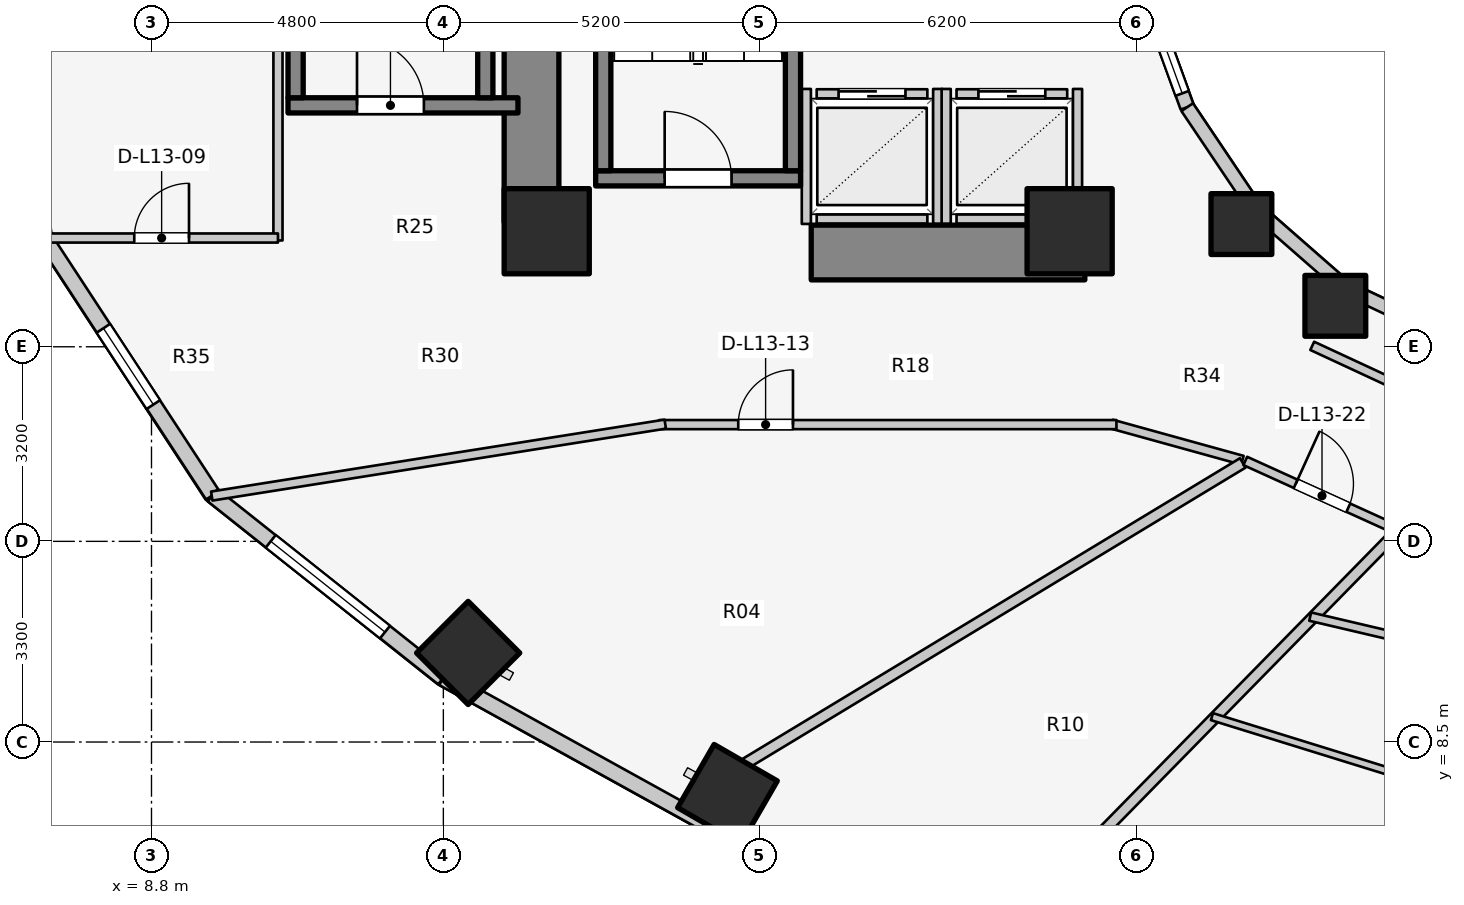
"""IFC4 building model, lengths in metres.
Left out: names, types, materials, properties, quantities, classifications, styles, units other than length and angle.
Written with IfcOpenShell. Run it as: python <this file> out.ifc"""

import sys

from ifc_helpers import new_model, si_unit, direction, frame, frame_2d, origin, origin_2d, place, context, subcontext, project, spatial, rectangle, extrude, element, fill, save


model = new_model("IFC4")
c1 = context("Model", 3, precision=1e-05, world=origin(), true_north=direction((0.0, 1.0)))
c2 = subcontext(c1, "Body", "Model", "MODEL_VIEW")
j1 = project(units=[si_unit("LENGTHUNIT", "METRE"), si_unit("PLANEANGLEUNIT", "RADIAN")], contexts=[c1])
p1 = place(None, origin())
s1 = spatial("IfcSite", under=j1, at=p1, CompositionType="ELEMENT")
p2 = place(p1, origin())
s2 = spatial("IfcBuilding", under=s1, at=p2, CompositionType="ELEMENT")
p3 = place(p2, frame((0.0, 0.0, 46.2)))
s3 = spatial("IfcBuildingStorey", under=s2, at=p3, CompositionType="ELEMENT", Elevation=46.2)
p4 = place(p3, frame((15.05, 17.05, 0.0), z_axis=(0.0, 0.0, 1.0), x_axis=(0.0, 1.0, 0.0)))
e1 = element("IfcWall", 1, at=p4, inside=s3, PredefinedType="SHEAR", context=c2, shape_type="SweptSolid", body=[
    extrude(rectangle(XDim=12.8, YDim=0.9, at=frame_2d((6.4, 0.0))), origin(), (0.0, 0.0, 1.0), 3.1),
])
p5 = place(p3, frame((19.65, 16.55, 0.0), z_axis=(0.0, 0.0, 1.0), x_axis=(1.0, 0.0, 0.0)))
e2 = element("IfcWall", 2, at=p5, inside=s3, PredefinedType="SHEAR", context=c2, shape_type="SweptSolid", body=[
    extrude(rectangle(XDim=4.5, YDim=0.9, at=frame_2d((2.25, 0.0))), origin(), (0.0, 0.0, 1.0), 3.1),
])
p6 = place(p3, frame((16.105, 17.77, 0.0), z_axis=(0.0, 0.0, 1.0), x_axis=(1.0, 0.0, 0.0)))
e3 = element("IfcWall", 3, at=p6, inside=s3, PredefinedType="SOLIDWALL", context=c2, shape_type="SweptSolid", body=[
    extrude(rectangle(XDim=3.37, YDim=0.25, at=frame_2d((1.685, 0.0))), origin(), (0.0, 0.0, 1.0), 3.1),
])
p7 = place(p6, frame((1.135, 0.0, 0.0)))
e4 = element("IfcOpeningElement", 4, at=p7, cuts=e3, PredefinedType="OPENING", context=c2, shape_type="SweptSolid", body=[
    extrude(rectangle(XDim=1.1, YDim=2.1, at=frame_2d((0.55, 1.05))), frame((0.0, 0.135, 0.0), z_axis=(0.0, -1.0, 0.0), x_axis=(1.0, 0.0, 0.0)), (0.0, 0.0, 1.0), 0.27),
])
for number, where, z_axis, x_axis in (
    (5, (16.23, 17.895, 0.0), (0.0, 0.0, 1.0), (0.0, 1.0, 0.0)),
    (6, (19.35, 17.895, 0.0), (0.0, 0.0, 1.0), (0.0, 1.0, 0.0)),
):
    element("IfcWall", number, at=place(p3, frame(where, z_axis=z_axis, x_axis=x_axis)), inside=s3, PredefinedType="SOLIDWALL", context=c2, shape_type="SweptSolid", body=[
        extrude(rectangle(XDim=7.81, YDim=0.25, at=frame_2d((3.905, 0.0))), origin(), (0.0, 0.0, 1.0), 3.1),
    ])
p8 = place(p3, frame((11.045, 18.97, 0.0), z_axis=(0.0, 0.0, 1.0), x_axis=(1.0, 0.0, 0.0)))
e7 = element("IfcWall", 7, at=p8, inside=s3, PredefinedType="SOLIDWALL", context=c2, shape_type="SweptSolid", body=[
    extrude(rectangle(XDim=3.782, YDim=0.25, at=frame_2d((1.891, 0.0))), origin(), (0.0, 0.0, 1.0), 3.1),
])
p9 = place(p8, frame((1.135, 0.0, 0.0)))
e8 = element("IfcOpeningElement", 8, at=p9, cuts=e7, PredefinedType="OPENING", context=c2, shape_type="SweptSolid", body=[
    extrude(rectangle(XDim=1.1, YDim=2.1, at=frame_2d((0.55, 1.05))), frame((0.0, 0.135, 0.0), z_axis=(0.0, -1.0, 0.0), x_axis=(1.0, 0.0, 0.0)), (0.0, 0.0, 1.0), 0.27),
])
for number, where, z_axis, x_axis in (
    (9, (11.17, 19.095, 0.0), (0.0, 0.0, 1.0), (0.0, 1.0, 0.0)),
    (10, (14.29, 19.095, 0.0), (0.0, 0.0, 1.0), (0.0, 1.0, 0.0)),
):
    element("IfcWall", number, at=place(p3, frame(where, z_axis=z_axis, x_axis=x_axis)), inside=s3, PredefinedType="SOLIDWALL", context=c2, shape_type="SweptSolid", body=[
        extrude(rectangle(XDim=7.81, YDim=0.25, at=frame_2d((3.905, 0.0))), origin(), (0.0, 0.0, 1.0), 3.1),
    ])
for number, where, z_axis, x_axis in (
    (11, (15.3, 16.9, 0.0), (0.0, 0.0, 1.0), (1.0, 0.0, 0.0)),
    (12, (23.9, 16.9, 0.0), (0.0, 0.0, 1.0), (1.0, 0.0, 0.0)),
):
    element("IfcColumn", number, at=place(p3, frame(where, z_axis=z_axis, x_axis=x_axis)), inside=s3, PredefinedType="COLUMN", context=c2, shape_type="SweptSolid", body=[
        extrude(rectangle(XDim=1.4, YDim=1.4, at=origin_2d()), origin(), (0.0, 0.0, 1.0), 3.1),
    ])
p10 = place(p3, frame((26.725, 17.018, 0.0), z_axis=(0.0, 0.0, 1.0), x_axis=(1.0, 0.0, 0.0)))
e13 = element("IfcColumn", 13, at=p10, inside=s3, PredefinedType="COLUMN", context=c2, shape_type="SweptSolid", body=[
    extrude(rectangle(XDim=1.0, YDim=1.0, at=origin_2d()), origin(), (0.0, 0.0, 1.0), 3.1),
])
p11 = place(p3, frame((14.008, 9.965, 0.0), z_axis=(0.0, 0.0, 1.0), x_axis=(-0.707106781187, -0.707106781187, 0.0)))
e14 = element("IfcColumn", 14, at=p11, inside=s3, PredefinedType="COLUMN", context=c2, shape_type="SweptSolid", body=[
    extrude(rectangle(XDim=1.2, YDim=1.2, at=origin_2d()), origin(), (0.0, 0.0, 1.0), 3.1),
])
p12 = place(p3, frame((28.27, 15.673, 0.0), z_axis=(0.0, 0.0, 1.0), x_axis=(1.0, 0.0, 0.0)))
e15 = element("IfcColumn", 15, at=p12, inside=s3, PredefinedType="COLUMN", context=c2, shape_type="SweptSolid", body=[
    extrude(rectangle(XDim=1.0, YDim=1.0, at=origin_2d()), origin(), (0.0, 0.0, 1.0), 3.1),
])
p13 = place(p3, frame((18.273, 7.641, 0.0), z_axis=(0.0, 0.0, 1.0), x_axis=(-0.5, -0.866025403784, 0.0)))
e16 = element("IfcColumn", 16, at=p13, inside=s3, PredefinedType="COLUMN", context=c2, shape_type="SweptSolid", body=[
    extrude(rectangle(XDim=1.2, YDim=1.2, at=origin_2d()), origin(), (0.0, 0.0, 1.0), 3.1),
])
p14 = place(p3, frame((25.123, 20.898, 0.0), z_axis=(0.0, 0.0, 1.0), x_axis=(0.341423187295, -0.93990968033, 0.0)))
e17 = element("IfcWall", 17, at=p14, inside=s3, PredefinedType="STANDARD", context=c2, shape_type="SweptSolid", body=[
    extrude(rectangle(XDim=2.084, YDim=0.23, at=frame_2d((1.042, 0.0))), origin(), (0.0, 0.0, 1.0), 2.84),
])
p15 = place(p14, frame((0.242, 0.0, 0.85)))
e18 = element("IfcOpeningElement", 18, at=p15, cuts=e17, PredefinedType="OPENING", context=c2, shape_type="SweptSolid", body=[
    extrude(rectangle(XDim=1.6, YDim=1.65, at=frame_2d((0.8, 0.825))), frame((0.0, 0.125, 0.0), z_axis=(0.0, -1.0, 0.0), x_axis=(1.0, 0.0, 0.0)), (0.0, 0.0, 1.0), 0.25),
])
p16 = place(p3, frame((25.834, 18.94, 0.0), z_axis=(0.0, 0.0, 1.0), x_axis=(0.558197800898, -0.829707909492, 0.0)))
e19 = element("IfcWall", 19, at=p16, inside=s3, PredefinedType="STANDARD", context=c2, shape_type="SweptSolid", body=[
    extrude(rectangle(XDim=2.027, YDim=0.23, at=frame_2d((1.013, 0.0))), origin(), (0.0, 0.0, 1.0), 2.16),
])
p17 = place(p3, frame((26.965, 17.258, 0.0), z_axis=(0.0, 0.0, 1.0), x_axis=(0.752576694707, -0.658504607869, 0.0)))
e20 = element("IfcWall", 20, at=p17, inside=s3, PredefinedType="STANDARD", context=c2, shape_type="SweptSolid", body=[
    extrude(rectangle(XDim=1.959, YDim=0.23, at=frame_2d((0.98, 0.0))), origin(), (0.0, 0.0, 1.0), 2.16),
])
p18 = place(p3, frame((28.44, 15.968, 0.0), z_axis=(0.0, 0.0, 1.0), x_axis=(0.904179699603, -0.427152280606, 0.0)))
e21 = element("IfcWall", 21, at=p18, inside=s3, PredefinedType="STANDARD", context=c2, shape_type="SweptSolid", body=[
    extrude(rectangle(XDim=1.899, YDim=0.23, at=frame_2d((0.95, 0.0))), origin(), (0.0, 0.0, 1.0), 2.16),
])
p19 = place(p3, frame((7.033, 16.795, 0.0), z_axis=(0.0, 0.0, 1.0), x_axis=(0.547702757047, -0.836672988642, 0.0)))
e22 = element("IfcWall", 22, at=p19, inside=s3, PredefinedType="STANDARD", context=c2, shape_type="SweptSolid", body=[
    extrude(rectangle(XDim=5.062, YDim=0.26, at=frame_2d((2.531, 0.0))), origin(), (0.0, 0.0, 1.0), 2.85),
])
p20 = place(p19, frame((1.781, 0.0, 0.75)))
e23 = element("IfcOpeningElement", 23, at=p20, cuts=e22, PredefinedType="OPENING", context=c2, shape_type="SweptSolid", body=[
    extrude(rectangle(XDim=1.5, YDim=1.6, at=frame_2d((0.75, 0.8))), frame((0.0, 0.14, 0.0), z_axis=(0.0, -1.0, 0.0), x_axis=(1.0, 0.0, 0.0)), (0.0, 0.0, 1.0), 0.28),
])
p21 = place(p3, frame((9.806, 12.559, 0.0), z_axis=(0.0, 0.0, 1.0), x_axis=(0.783123133379, -0.621866672179, 0.0)))
e24 = element("IfcWall", 24, at=p21, inside=s3, PredefinedType="STANDARD", context=c2, shape_type="SweptSolid", body=[
    extrude(rectangle(XDim=4.839, YDim=0.26, at=frame_2d((2.419, 0.0))), origin(), (0.0, 0.0, 1.0), 2.85),
])
p22 = place(p21, frame((1.219, 0.0, 0.75)))
e25 = element("IfcOpeningElement", 25, at=p22, cuts=e24, PredefinedType="OPENING", context=c2, shape_type="SweptSolid", body=[
    extrude(rectangle(XDim=2.4, YDim=1.7, at=frame_2d((1.2, 0.85))), frame((0.0, 0.14, 0.0), z_axis=(0.0, -1.0, 0.0), x_axis=(1.0, 0.0, 0.0)), (0.0, 0.0, 1.0), 0.28),
])
p23 = place(p3, frame((13.595, 9.55, 0.0), z_axis=(0.0, 0.0, 1.0), x_axis=(0.875137303239, -0.483874674352, 0.0)))
e26 = element("IfcWall", 26, at=p23, inside=s3, PredefinedType="STANDARD", context=c2, shape_type="SweptSolid", body=[
    extrude(rectangle(XDim=4.985, YDim=0.26, at=frame_2d((2.493, 0.0))), origin(), (0.0, 0.0, 1.0), 2.85),
])
p24 = place(p3, frame((17.958, 7.138, 0.0), z_axis=(0.0, 0.0, 1.0), x_axis=(0.958843593522, -0.283934786811, 0.0)))
e27 = element("IfcWall", 27, at=p24, inside=s3, PredefinedType="STANDARD", context=c2, shape_type="SweptSolid", body=[
    extrude(rectangle(XDim=5.955, YDim=0.26, at=frame_2d((2.978, 0.0))), origin(), (0.0, 0.0, 1.0), 2.85),
])
p25 = place(p24, frame((2.228, 0.0, 0.75)))
e28 = element("IfcOpeningElement", 28, at=p25, cuts=e27, PredefinedType="OPENING", context=c2, shape_type="SweptSolid", body=[
    extrude(rectangle(XDim=1.5, YDim=1.6, at=frame_2d((0.75, 0.8))), frame((0.0, 0.14, 0.0), z_axis=(0.0, -1.0, 0.0), x_axis=(1.0, 0.0, 0.0)), (0.0, 0.0, 1.0), 0.28),
])
p26 = place(p3, frame((19.74, 19.16, 0.0), z_axis=(0.0, 0.0, 1.0), x_axis=(1.0, 0.0, 0.0)))
e29 = element("IfcWall", 29, at=p26, inside=s3, PredefinedType="SOLIDWALL", context=c2, shape_type="SweptSolid", body=[
    extrude(rectangle(XDim=1.82, YDim=0.15, at=frame_2d((0.91, 0.0))), origin(), (0.0, 0.0, 1.0), 2.855),
])
p27 = place(p26, frame((0.36, 0.0, 0.0)))
e30 = element("IfcOpeningElement", 30, at=p27, cuts=e29, PredefinedType="OPENING", context=c2, shape_type="SweptSolid", body=[
    extrude(rectangle(XDim=1.1, YDim=2.1, at=frame_2d((0.55, 1.05))), frame((0.0, 0.085, 0.0), z_axis=(0.0, -1.0, 0.0), x_axis=(1.0, 0.0, 0.0)), (0.0, 0.0, 1.0), 0.17),
])
p28 = place(p3, frame((19.74, 17.1, 0.0), z_axis=(0.0, 0.0, 1.0), x_axis=(1.0, 0.0, 0.0)))
e31 = element("IfcWall", 31, at=p28, inside=s3, PredefinedType="SOLIDWALL", context=c2, shape_type="SweptSolid", body=[
    extrude(rectangle(XDim=1.82, YDim=0.15, at=frame_2d((0.91, 0.0))), origin(), (0.0, 0.0, 1.0), 2.855),
])
p29 = place(p3, frame((19.57, 17.02, 0.0), z_axis=(0.0, 0.0, 1.0), x_axis=(0.0, 1.0, 0.0)))
e32 = element("IfcWall", 32, at=p29, inside=s3, PredefinedType="SOLIDWALL", context=c2, shape_type="SweptSolid", body=[
    extrude(rectangle(XDim=2.22, YDim=0.15, at=frame_2d((1.11, 0.0))), origin(), (0.0, 0.0, 1.0), 2.12),
])
p30 = place(p3, frame((21.73, 17.02, 0.0), z_axis=(0.0, 0.0, 1.0), x_axis=(0.0, 1.0, 0.0)))
e33 = element("IfcWall", 33, at=p30, inside=s3, PredefinedType="SOLIDWALL", context=c2, shape_type="SweptSolid", body=[
    extrude(rectangle(XDim=2.22, YDim=0.15, at=frame_2d((1.11, 0.0))), origin(), (0.0, 0.0, 1.0), 2.855),
])
p31 = place(p3, frame((22.04, 19.16, 0.0), z_axis=(0.0, 0.0, 1.0), x_axis=(1.0, 0.0, 0.0)))
e34 = element("IfcWall", 34, at=p31, inside=s3, PredefinedType="SOLIDWALL", context=c2, shape_type="SweptSolid", body=[
    extrude(rectangle(XDim=1.82, YDim=0.15, at=frame_2d((0.91, 0.0))), origin(), (0.0, 0.0, 1.0), 2.12),
])
p32 = place(p31, frame((0.36, 0.0, 0.0)))
e35 = element("IfcOpeningElement", 35, at=p32, cuts=e34, PredefinedType="OPENING", context=c2, shape_type="SweptSolid", body=[
    extrude(rectangle(XDim=1.1, YDim=2.1, at=frame_2d((0.55, 1.05))), frame((0.0, 0.085, 0.0), z_axis=(0.0, -1.0, 0.0), x_axis=(1.0, 0.0, 0.0)), (0.0, 0.0, 1.0), 0.17),
])
p33 = place(p3, frame((22.04, 17.1, 0.0), z_axis=(0.0, 0.0, 1.0), x_axis=(1.0, 0.0, 0.0)))
e36 = element("IfcWall", 36, at=p33, inside=s3, PredefinedType="SOLIDWALL", context=c2, shape_type="SweptSolid", body=[
    extrude(rectangle(XDim=1.82, YDim=0.15, at=frame_2d((0.91, 0.0))), origin(), (0.0, 0.0, 1.0), 2.12),
])
p34 = place(p3, frame((21.87, 17.02, 0.0), z_axis=(0.0, 0.0, 1.0), x_axis=(0.0, 1.0, 0.0)))
e37 = element("IfcWall", 37, at=p34, inside=s3, PredefinedType="SOLIDWALL", context=c2, shape_type="SweptSolid", body=[
    extrude(rectangle(XDim=2.22, YDim=0.15, at=frame_2d((1.11, 0.0))), origin(), (0.0, 0.0, 1.0), 2.855),
])
p35 = place(p3, frame((24.03, 17.02, 0.0), z_axis=(0.0, 0.0, 1.0), x_axis=(0.0, 1.0, 0.0)))
e38 = element("IfcWall", 38, at=p35, inside=s3, PredefinedType="SOLIDWALL", context=c2, shape_type="SweptSolid", body=[
    extrude(rectangle(XDim=2.22, YDim=0.15, at=frame_2d((1.11, 0.0))), origin(), (0.0, 0.0, 1.0), 2.12),
])
p36 = place(p3, frame((27.89, 15.015, 0.0), z_axis=(0.0, 0.0, 1.0), x_axis=(0.906943449489, -0.421252393975, 0.0)))
e39 = element("IfcWall", 39, at=p36, inside=s3, PredefinedType="PARTITIONING", context=c2, shape_type="SweptSolid", body=[
    extrude(rectangle(XDim=2.186, YDim=0.15, at=frame_2d((1.093, 0.0))), origin(), (0.0, 0.0, 1.0), 2.237),
])
p37 = place(p3, frame((10.88, 16.748, 0.0), z_axis=(0.0, 0.0, 1.0), x_axis=(0.0, 1.0, 0.0)))
e40 = element("IfcWall", 40, at=p37, inside=s3, PredefinedType="PARTITIONING", context=c2, shape_type="SweptSolid", body=[
    extrude(rectangle(XDim=12.503, YDim=0.15, at=frame_2d((6.252, 0.0))), origin(), (0.0, 0.0, 1.0), 2.12),
])
p38 = place(p3, frame((7.014, 16.788, 0.0), z_axis=(0.0, 0.0, 1.0), x_axis=(1.0, 0.0, 0.0)))
e41 = element("IfcWall", 41, at=p38, inside=s3, PredefinedType="PARTITIONING", context=c2, shape_type="SweptSolid", body=[
    extrude(rectangle(XDim=3.866, YDim=0.15, at=frame_2d((1.933, 0.0))), origin(), (0.0, 0.0, 1.0), 2.855),
])
p39 = place(p38, frame((1.503, 0.0, 0.0)))
e42 = element("IfcOpeningElement", 42, at=p39, cuts=e41, PredefinedType="OPENING", context=c2, shape_type="SweptSolid", body=[
    extrude(rectangle(XDim=0.9, YDim=2.1, at=frame_2d((0.45, 1.05))), frame((0.0, 0.085, 0.0), z_axis=(0.0, -1.0, 0.0), x_axis=(1.0, 0.0, 0.0)), (0.0, 0.0, 1.0), 0.17),
])
p40 = place(p3, frame((26.742, 13.133, 0.0), z_axis=(0.0, 0.0, 1.0), x_axis=(-0.963833843713, 0.266503886865, 0.0)))
e43 = element("IfcWall", 43, at=p40, inside=s3, PredefinedType="PARTITIONING", context=c2, shape_type="SweptSolid", body=[
    extrude(rectangle(XDim=2.232, YDim=0.15, at=frame_2d((1.116, 0.0))), origin(), (0.0, 0.0, 1.0), 2.237),
])
p41 = place(p3, frame((17.15, 13.72, 0.0), z_axis=(0.0, 0.0, 1.0), x_axis=(1.0, 0.0, 0.0)))
e44 = element("IfcWall", 44, at=p41, inside=s3, PredefinedType="PARTITIONING", context=c2, shape_type="SweptSolid", body=[
    extrude(rectangle(XDim=7.52, YDim=0.15, at=frame_2d((3.76, 0.0))), origin(), (0.0, 0.0, 1.0), 2.237),
])
p42 = place(p41, frame((1.3, 0.0, 0.0)))
e45 = element("IfcOpeningElement", 45, at=p42, cuts=e44, PredefinedType="OPENING", context=c2, shape_type="SweptSolid", body=[
    extrude(rectangle(XDim=0.9, YDim=2.1, at=frame_2d((0.45, 1.05))), frame((0.0, 0.085, 0.0), z_axis=(0.0, -1.0, 0.0), x_axis=(1.0, 0.0, 0.0)), (0.0, 0.0, 1.0), 0.17),
])
p43 = place(p3, frame((17.25, 13.728, 0.0), z_axis=(0.0, 0.0, 1.0), x_axis=(-0.987655781226, -0.156639898525, 0.0)))
e46 = element("IfcWall", 46, at=p43, inside=s3, PredefinedType="PARTITIONING", context=c2, shape_type="SweptSolid", body=[
    extrude(rectangle(XDim=7.552, YDim=0.15, at=frame_2d((3.776, 0.0))), origin(), (0.0, 0.0, 1.0), 2.069),
])
p44 = place(p3, frame((26.748, 13.09, 0.0), z_axis=(0.0, 0.0, 1.0), x_axis=(-0.855817136021, -0.517278483694, 0.0)))
e47 = element("IfcWall", 47, at=p44, inside=s3, PredefinedType="PARTITIONING", context=c2, shape_type="SweptSolid", body=[
    extrude(rectangle(XDim=9.564, YDim=0.18, at=frame_2d((4.782, 0.0))), origin(), (0.0, 0.0, 1.0), 2.237),
])
p45 = place(p3, frame((29.267, 11.939, 0.0), z_axis=(0.0, 0.0, 1.0), x_axis=(-0.700234780085, -0.713912636644, 0.0)))
e48 = element("IfcWall", 48, at=p45, inside=s3, PredefinedType="PARTITIONING", context=c2, shape_type="SweptSolid", body=[
    extrude(rectangle(XDim=7.515, YDim=0.18, at=frame_2d((3.757, 0.0))), origin(), (0.0, 0.0, 1.0), 2.237),
])
p46 = place(p3, frame((26.789, 13.123, 0.0), z_axis=(0.0, 0.0, 1.0), x_axis=(0.910568469686, -0.41335827319, 0.0)))
e49 = element("IfcWall", 49, at=p46, inside=s3, PredefinedType="PARTITIONING", context=c2, shape_type="SweptSolid", body=[
    extrude(rectangle(XDim=2.772, YDim=0.15, at=frame_2d((1.386, 0.0))), origin(), (0.0, 0.0, 1.0), 2.237),
])
p47 = place(p46, frame((0.911, 0.0, 0.0)))
e50 = element("IfcOpeningElement", 50, at=p47, cuts=e49, PredefinedType="OPENING", context=c2, shape_type="SweptSolid", body=[
    extrude(rectangle(XDim=0.95, YDim=2.1, at=frame_2d((0.475, 1.05))), frame((0.0, 0.085, 0.0), z_axis=(0.0, -1.0, 0.0), x_axis=(1.0, 0.0, 0.0)), (0.0, 0.0, 1.0), 0.17),
])
p48 = place(p3, frame((26.241, 8.917, 0.0), z_axis=(0.0, 0.0, 1.0), x_axis=(0.955191504197, -0.29598849692, 0.0)))
e51 = element("IfcWall", 51, at=p48, inside=s3, PredefinedType="MOVABLE", context=c2, shape_type="SweptSolid", body=[
    extrude(rectangle(XDim=6.039, YDim=0.12, at=frame_2d((3.02, 0.0))), origin(), (0.0, 0.0, 1.0), 2.237),
])
p49 = place(p3, frame((27.856, 10.562, 0.0), z_axis=(0.0, 0.0, 1.0), x_axis=(0.973546394015, -0.228489427982, 0.0)))
e52 = element("IfcWall", 52, at=p49, inside=s3, PredefinedType="PLUMBINGWALL", context=c2, shape_type="SweptSolid", body=[
    extrude(rectangle(XDim=4.306, YDim=0.14, at=frame_2d((2.153, 0.0))), origin(), (0.0, 0.0, 1.0), 2.237),
])
p50 = place(p49, frame((1.703, 0.0, 0.0)))
e53 = element("IfcOpeningElement", 53, at=p50, cuts=e52, PredefinedType="OPENING", context=c2, shape_type="SweptSolid", body=[
    extrude(rectangle(XDim=0.9, YDim=2.1, at=frame_2d((0.45, 1.05))), frame((0.0, 0.08, 0.0), z_axis=(0.0, -1.0, 0.0), x_axis=(1.0, 0.0, 0.0)), (0.0, 0.0, 1.0), 0.16),
])
p51 = place(p15, origin())
e54 = element("IfcWindow", 54, at=p51, inside=s3, PartitioningType="SINGLE_PANEL", PredefinedType="WINDOW", context=c2, shape_type="SweptSolid", body=[
    extrude(rectangle(XDim=1.6, YDim=1.65, at=frame_2d((0.8, 0.825))), frame((0.0, 0.03, 0.0), z_axis=(0.0, -1.0, 0.0), x_axis=(1.0, 0.0, 0.0)), (0.0, 0.0, 1.0), 0.06),
])
fill(e18, e54)
p52 = place(p20, origin())
e55 = element("IfcWindow", 55, at=p52, inside=s3, PartitioningType="SINGLE_PANEL", PredefinedType="WINDOW", context=c2, shape_type="SweptSolid", body=[
    extrude(rectangle(XDim=1.5, YDim=1.6, at=frame_2d((0.75, 0.8))), frame((0.0, 0.03, 0.0), z_axis=(0.0, -1.0, 0.0), x_axis=(1.0, 0.0, 0.0)), (0.0, 0.0, 1.0), 0.06),
])
fill(e23, e55)
p53 = place(p22, origin())
e56 = element("IfcWindow", 56, at=p53, inside=s3, PartitioningType="SINGLE_PANEL", PredefinedType="WINDOW", context=c2, shape_type="SweptSolid", body=[
    extrude(rectangle(XDim=2.4, YDim=1.7, at=frame_2d((1.2, 0.85))), frame((0.0, 0.03, 0.0), z_axis=(0.0, -1.0, 0.0), x_axis=(1.0, 0.0, 0.0)), (0.0, 0.0, 1.0), 0.06),
])
fill(e25, e56)
p54 = place(p7, origin())
e57 = element("IfcDoor", 57, at=p54, inside=s3, OperationType="SINGLE_SWING_LEFT", PredefinedType="DOOR", context=c2, shape_type="SweptSolid", body=[
    extrude(rectangle(XDim=1.1, YDim=2.1, at=frame_2d((0.55, 1.05))), frame((0.0, 0.025, 0.0), z_axis=(0.0, -1.0, 0.0), x_axis=(1.0, 0.0, 0.0)), (0.0, 0.0, 1.0), 0.05),
])
fill(e4, e57)
p55 = place(p9, origin())
e58 = element("IfcDoor", 58, at=p55, inside=s3, OperationType="SINGLE_SWING_LEFT", PredefinedType="DOOR", context=c2, shape_type="SweptSolid", body=[
    extrude(rectangle(XDim=1.1, YDim=2.1, at=frame_2d((0.55, 1.05))), frame((0.0, 0.025, 0.0), z_axis=(0.0, -1.0, 0.0), x_axis=(1.0, 0.0, 0.0)), (0.0, 0.0, 1.0), 0.05),
])
fill(e8, e58)
p56 = place(p27, origin())
e59 = element("IfcDoor", 59, at=p56, inside=s3, OperationType="DOUBLE_DOOR_SLIDING", PredefinedType="DOOR", context=c2, shape_type="SweptSolid", body=[
    extrude(rectangle(XDim=1.1, YDim=2.1, at=frame_2d((0.55, 1.05))), frame((0.0, 0.025, 0.0), z_axis=(0.0, -1.0, 0.0), x_axis=(1.0, 0.0, 0.0)), (0.0, 0.0, 1.0), 0.05),
])
fill(e30, e59)
p57 = place(p32, origin())
e60 = element("IfcDoor", 60, at=p57, inside=s3, OperationType="DOUBLE_DOOR_SLIDING", PredefinedType="DOOR", context=c2, shape_type="SweptSolid", body=[
    extrude(rectangle(XDim=1.1, YDim=2.1, at=frame_2d((0.55, 1.05))), frame((0.0, 0.025, 0.0), z_axis=(0.0, -1.0, 0.0), x_axis=(1.0, 0.0, 0.0)), (0.0, 0.0, 1.0), 0.05),
])
fill(e35, e60)
p58 = place(p39, origin())
e61 = element("IfcDoor", 61, at=p58, inside=s3, OperationType="SINGLE_SWING_RIGHT", PredefinedType="DOOR", context=c2, shape_type="SweptSolid", body=[
    extrude(rectangle(XDim=0.9, YDim=2.1, at=frame_2d((0.45, 1.05))), frame((0.0, 0.025, 0.0), z_axis=(0.0, -1.0, 0.0), x_axis=(1.0, 0.0, 0.0)), (0.0, 0.0, 1.0), 0.05),
])
fill(e42, e61)
p59 = place(p42, origin())
e62 = element("IfcDoor", 62, at=p59, inside=s3, OperationType="SINGLE_SWING_RIGHT", PredefinedType="DOOR", context=c2, shape_type="SweptSolid", body=[
    extrude(rectangle(XDim=0.9, YDim=2.1, at=frame_2d((0.45, 1.05))), frame((0.0, 0.025, 0.0), z_axis=(0.0, -1.0, 0.0), x_axis=(1.0, 0.0, 0.0)), (0.0, 0.0, 1.0), 0.05),
])
fill(e45, e62)
p60 = place(p47, origin())
e63 = element("IfcDoor", 63, at=p60, inside=s3, OperationType="SINGLE_SWING_LEFT", PredefinedType="DOOR", context=c2, shape_type="SweptSolid", body=[
    extrude(rectangle(XDim=0.95, YDim=2.1, at=frame_2d((0.475, 1.05))), frame((0.0, 0.025, 0.0), z_axis=(0.0, -1.0, 0.0), x_axis=(1.0, 0.0, 0.0)), (0.0, 0.0, 1.0), 0.05),
])
fill(e50, e63)
save(model, sys.argv[1])
